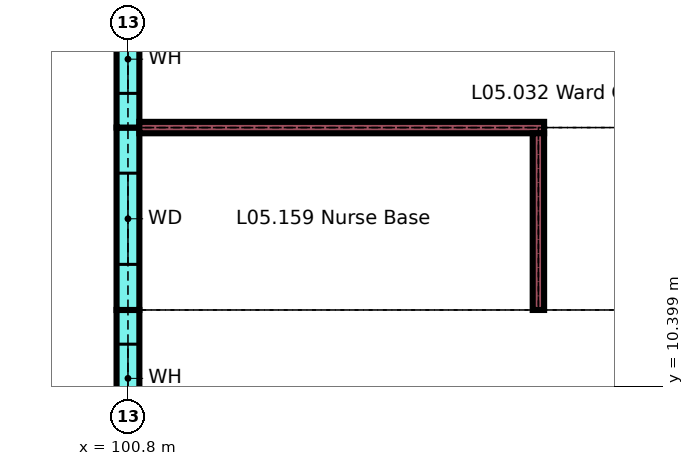
"""IFC4 building model, lengths in metres.
Left out: names, types, materials, properties, quantities, classifications, styles, units other than length and angle.
Written with IfcOpenShell. Run it as: python <this file> out.ifc"""

import sys

from ifc_helpers import new_model, si_unit, direction, frame, frame_2d, origin, place, context, subcontext, project, spatial, rectangle, extrude, element, fill, save


model = new_model("IFC4")
c1 = context("Model", 3, precision=1e-05, world=origin(), true_north=direction((0.0, 1.0)))
c2 = subcontext(c1, "Body", "Model", "MODEL_VIEW")
j1 = project(units=[si_unit("LENGTHUNIT", "METRE"), si_unit("PLANEANGLEUNIT", "RADIAN")], contexts=[c1])
p1 = place(None, origin())
s1 = spatial("IfcSite", under=j1, at=p1, CompositionType="ELEMENT")
p2 = place(p1, origin())
s2 = spatial("IfcBuilding", under=s1, at=p2, CompositionType="ELEMENT")
p3 = place(p2, frame((0.0, 0.0, 22.5)))
s3 = spatial("IfcBuildingStorey", under=s2, at=p3, CompositionType="ELEMENT", Elevation=22.5)
p4 = place(p3, frame((100.8, 8.4, 0.0), z_axis=(0.0, 0.0, 1.0), x_axis=(0.0, 1.0, 0.0)))
e1 = element("IfcWall", 1, at=p4, inside=s3, PredefinedType="SOLIDWALL", context=c2, shape_type="SweptSolid", body=[
    extrude(rectangle(XDim=3.0, YDim=0.3, at=frame_2d((1.5, 0.0))), origin(), (0.0, 0.0, 1.0), 3.26),
])
p5 = place(p4, frame((1.65, 0.0, 0.9)))
e2 = element("IfcOpeningElement", 2, at=p5, cuts=e1, PredefinedType="OPENING", context=c2, shape_type="SweptSolid", body=[
    extrude(rectangle(XDim=0.9, YDim=1.5, at=frame_2d((0.45, 0.75))), frame((0.0, 0.16, 0.0), z_axis=(0.0, -1.0, 0.0), x_axis=(1.0, 0.0, 0.0)), (0.0, 0.0, 1.0), 0.32),
])
p6 = place(p3, frame((100.8, 11.4, 0.0), z_axis=(0.0, 0.0, 1.0), x_axis=(0.0, 1.0, 0.0)))
e3 = element("IfcWall", 3, at=p6, inside=s3, PredefinedType="SOLIDWALL", context=c2, shape_type="SweptSolid", body=[
    extrude(rectangle(XDim=2.4, YDim=0.3, at=frame_2d((1.2, 0.0))), origin(), (0.0, 0.0, 1.0), 3.26),
])
p7 = place(p6, frame((0.6, 0.0, 0.9)))
e4 = element("IfcOpeningElement", 4, at=p7, cuts=e3, PredefinedType="OPENING", context=c2, shape_type="SweptSolid", body=[
    extrude(rectangle(XDim=1.2, YDim=1.5, at=frame_2d((0.6, 0.75))), frame((0.0, 0.16, 0.0), z_axis=(0.0, -1.0, 0.0), x_axis=(1.0, 0.0, 0.0)), (0.0, 0.0, 1.0), 0.32),
])
p8 = place(p3, frame((100.8, 13.8, 0.0), z_axis=(0.0, 0.0, 1.0), x_axis=(0.0, 1.0, 0.0)))
e5 = element("IfcWall", 5, at=p8, inside=s3, PredefinedType="SOLIDWALL", context=c2, shape_type="SweptSolid", body=[
    extrude(rectangle(XDim=2.625, YDim=0.3, at=frame_2d((1.312, 0.0))), origin(), (0.0, 0.0, 1.0), 3.26),
])
p9 = place(p8, frame((0.45, 0.0, 0.9)))
e6 = element("IfcOpeningElement", 6, at=p9, cuts=e5, PredefinedType="OPENING", context=c2, shape_type="SweptSolid", body=[
    extrude(rectangle(XDim=0.9, YDim=1.5, at=frame_2d((0.45, 0.75))), frame((0.0, 0.16, 0.0), z_axis=(0.0, -1.0, 0.0), x_axis=(1.0, 0.0, 0.0)), (0.0, 0.0, 1.0), 0.32),
])
p10 = place(p3, frame((100.95, 13.8, 0.0), z_axis=(0.0, 0.0, 1.0), x_axis=(1.0, 0.0, 0.0)))
e7 = element("IfcWall", 7, at=p10, inside=s3, PredefinedType="PARTITIONING", context=c2, shape_type="SweptSolid", body=[
    extrude(rectangle(XDim=5.325, YDim=0.15, at=frame_2d((2.663, 0.0))), origin(), (0.0, 0.0, 1.0), 3.26),
])
p11 = place(p3, frame((106.2, 11.4, 0.0), z_axis=(0.0, 0.0, 1.0), x_axis=(0.0, 1.0, 0.0)))
e8 = element("IfcWall", 8, at=p11, inside=s3, PredefinedType="PARTITIONING", context=c2, shape_type="SweptSolid", body=[
    extrude(rectangle(XDim=2.325, YDim=0.15, at=frame_2d((1.163, 0.0))), origin(), (0.0, 0.0, 1.0), 3.26),
])
p12 = place(p5, origin())
e9 = element("IfcWindow", 9, at=p12, inside=s3, PartitioningType="SINGLE_PANEL", PredefinedType="WINDOW", context=c2, shape_type="SweptSolid", body=[
    extrude(rectangle(XDim=0.9, YDim=1.5, at=frame_2d((0.45, 0.75))), frame((0.0, 0.03, 0.0), z_axis=(0.0, -1.0, 0.0), x_axis=(1.0, 0.0, 0.0)), (0.0, 0.0, 1.0), 0.06),
])
fill(e2, e9)
p13 = place(p7, origin())
e10 = element("IfcWindow", 10, at=p13, inside=s3, PartitioningType="SINGLE_PANEL", PredefinedType="WINDOW", context=c2, shape_type="SweptSolid", body=[
    extrude(rectangle(XDim=1.2, YDim=1.5, at=frame_2d((0.6, 0.75))), frame((0.0, 0.03, 0.0), z_axis=(0.0, -1.0, 0.0), x_axis=(1.0, 0.0, 0.0)), (0.0, 0.0, 1.0), 0.06),
])
fill(e4, e10)
p14 = place(p9, origin())
e11 = element("IfcWindow", 11, at=p14, inside=s3, PartitioningType="SINGLE_PANEL", PredefinedType="WINDOW", context=c2, shape_type="SweptSolid", body=[
    extrude(rectangle(XDim=0.9, YDim=1.5, at=frame_2d((0.45, 0.75))), frame((0.0, 0.03, 0.0), z_axis=(0.0, -1.0, 0.0), x_axis=(1.0, 0.0, 0.0)), (0.0, 0.0, 1.0), 0.06),
])
fill(e6, e11)
save(model, sys.argv[1])
